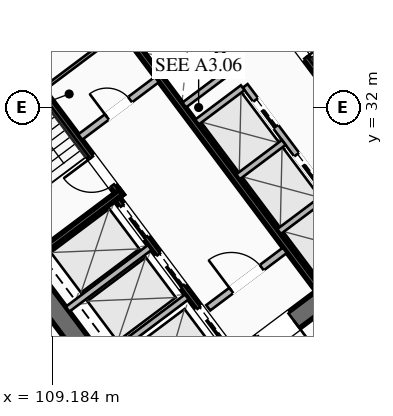
"""IFC4 building model, lengths in metres.
Left out: names, types, materials, properties, quantities, classifications, styles, units other than length and angle.
Written with IfcOpenShell. Run it as: python <this file> out.ifc"""

import sys

from ifc_helpers import new_model, si_unit, direction, frame, frame_2d, origin, place, context, subcontext, project, spatial, rectangle, extrude, element, fill, save


model = new_model("IFC4")
c1 = context("Model", 3, precision=1e-05, world=origin(), true_north=direction((0.0, 1.0)))
c2 = subcontext(c1, "Body", "Model", "MODEL_VIEW")
j1 = project(units=[si_unit("LENGTHUNIT", "METRE"), si_unit("PLANEANGLEUNIT", "RADIAN")], contexts=[c1])
p1 = place(None, origin())
s1 = spatial("IfcSite", under=j1, at=p1, CompositionType="ELEMENT")
p2 = place(p1, origin())
s2 = spatial("IfcBuilding", under=s1, at=p2, CompositionType="ELEMENT")
p3 = place(p2, frame((0.0, 0.0, 84.95)))
s3 = spatial("IfcBuildingStorey", under=s2, at=p3, CompositionType="ELEMENT", Elevation=84.95)
for number, where, z_axis, x_axis in (
    (1, (112.476, 21.107, 0.0), (0.0, 0.0, 1.0), (-0.6, 0.8, 0.0)),
    (2, (115.524, 42.893, 0.0), (0.0, 0.0, 1.0), (0.6, -0.8, 0.0)),
):
    element("IfcWall", number, at=place(p3, frame(where, z_axis=z_axis, x_axis=x_axis)), inside=s3, PredefinedType="SHEAR", context=c2, shape_type="SweptSolid", body=[
        extrude(rectangle(XDim=15.6, YDim=0.65, at=frame_2d((7.8, 0.0))), origin(), (0.0, 0.0, 1.0), 3.55),
    ])
p4 = place(p3, frame((124.429, 30.478, 0.0), z_axis=(0.0, 0.0, 1.0), x_axis=(-0.799998028465, -0.600002628705, 0.0)))
e3 = element("IfcWall", 3, at=p4, inside=s3, PredefinedType="SHEAR", context=c2, shape_type="SweptSolid", body=[
    extrude(rectangle(XDim=14.86, YDim=0.65, at=frame_2d((7.43, 0.0))), origin(), (0.0, 0.0, 1.0), 3.55),
])
p5 = place(p4, frame((9.13, 0.0, 0.0)))
e4 = element("IfcOpeningElement", 4, at=p5, cuts=e3, PredefinedType="OPENING", context=c2, shape_type="SweptSolid", body=[
    extrude(rectangle(XDim=1.25, YDim=2.25, at=frame_2d((0.625, 1.125))), frame((0.0, 0.335, 0.0), z_axis=(0.0, -1.0, 0.0), x_axis=(1.0, 0.0, 0.0)), (0.0, 0.0, 1.0), 0.67),
])
p6 = place(p4, frame((4.08, 0.0, 0.0)))
e5 = element("IfcOpeningElement", 5, at=p6, cuts=e3, PredefinedType="OPENING", context=c2, shape_type="SweptSolid", body=[
    extrude(rectangle(XDim=1.25, YDim=2.25, at=frame_2d((0.625, 1.125))), frame((0.0, 0.335, 0.0), z_axis=(0.0, -1.0, 0.0), x_axis=(1.0, 0.0, 0.0)), (0.0, 0.0, 1.0), 0.67),
])
p7 = place(p3, frame((103.571, 33.522, 0.0), z_axis=(0.0, 0.0, 1.0), x_axis=(0.799998028465, 0.600002628705, 0.0)))
e6 = element("IfcWall", 6, at=p7, inside=s3, PredefinedType="SHEAR", context=c2, shape_type="SweptSolid", body=[
    extrude(rectangle(XDim=14.86, YDim=0.65, at=frame_2d((7.43, 0.0))), origin(), (0.0, 0.0, 1.0), 3.55),
])
p8 = place(p7, frame((4.48, 0.0, 0.0)))
e7 = element("IfcOpeningElement", 7, at=p8, cuts=e6, PredefinedType="OPENING", context=c2, shape_type="SweptSolid", body=[
    extrude(rectangle(XDim=1.25, YDim=2.25, at=frame_2d((0.625, 1.125))), frame((0.0, 0.335, 0.0), z_axis=(0.0, -1.0, 0.0), x_axis=(1.0, 0.0, 0.0)), (0.0, 0.0, 1.0), 0.67),
])
p9 = place(p7, frame((9.53, 0.0, 0.0)))
e8 = element("IfcOpeningElement", 8, at=p9, cuts=e6, PredefinedType="OPENING", context=c2, shape_type="SweptSolid", body=[
    extrude(rectangle(XDim=1.25, YDim=2.25, at=frame_2d((0.625, 1.125))), frame((0.0, 0.335, 0.0), z_axis=(0.0, -1.0, 0.0), x_axis=(1.0, 0.0, 0.0)), (0.0, 0.0, 1.0), 0.67),
])
p10 = place(p3, frame((111.44, 29.08, 0.0), z_axis=(0.0, 0.0, 1.0), x_axis=(-0.600009827119, 0.799992629566, 0.0)))
e9 = element("IfcWall", 9, at=p10, inside=s3, PredefinedType="SHEAR", context=c2, shape_type="SweptSolid", body=[
    extrude(rectangle(XDim=7.95, YDim=0.2, at=frame_2d((3.975, 0.0))), origin(), (0.0, 0.0, 1.0), 3.35),
])
p11 = place(p10, frame((0.45, 0.0, 0.0)))
e10 = element("IfcOpeningElement", 10, at=p11, cuts=e9, PredefinedType="OPENING", context=c2, shape_type="SweptSolid", body=[
    extrude(rectangle(XDim=1.15, YDim=2.2, at=frame_2d((0.575, 1.1))), frame((0.0, 0.11, 0.0), z_axis=(0.0, -1.0, 0.0), x_axis=(1.0, 0.0, 0.0)), (0.0, 0.0, 1.0), 0.22),
])
p12 = place(p3, frame((108.476, 26.982, 0.0), z_axis=(0.0, 0.0, 1.0), x_axis=(0.799984290658, 0.600020945218, 0.0)))
e11 = element("IfcWall", 11, at=p12, inside=s3, PredefinedType="SHEAR", context=c2, shape_type="SweptSolid", body=[
    extrude(rectangle(XDim=3.73, YDim=0.2, at=frame_2d((1.865, 0.0))), origin(), (0.0, 0.0, 1.0), 3.35),
])
p13 = place(p3, frame((116.56, 34.92, 0.0), z_axis=(0.0, 0.0, 1.0), x_axis=(0.600009827119, -0.799992629566, 0.0)))
e12 = element("IfcWall", 12, at=p13, inside=s3, PredefinedType="SHEAR", context=c2, shape_type="SweptSolid", body=[
    extrude(rectangle(XDim=7.95, YDim=0.2, at=frame_2d((3.975, 0.0))), origin(), (0.0, 0.0, 1.0), 3.35),
])
p14 = place(p13, frame((0.45, 0.0, 0.0)))
e13 = element("IfcOpeningElement", 13, at=p14, cuts=e12, PredefinedType="OPENING", context=c2, shape_type="SweptSolid", body=[
    extrude(rectangle(XDim=1.15, YDim=2.2, at=frame_2d((0.575, 1.1))), frame((0.0, 0.11, 0.0), z_axis=(0.0, -1.0, 0.0), x_axis=(1.0, 0.0, 0.0)), (0.0, 0.0, 1.0), 0.22),
])
p15 = place(p3, frame((117.938, 26.016, 0.0), z_axis=(0.0, 0.0, 1.0), x_axis=(-0.600005463273, 0.799995902516, 0.0)))
e14 = element("IfcWall", 14, at=p15, inside=s3, PredefinedType="SHEAR", context=c2, shape_type="SweptSolid", body=[
    extrude(rectangle(XDim=14.3, YDim=0.2, at=frame_2d((7.15, 0.0))), origin(), (0.0, 0.0, 1.0), 3.35),
])
p16 = place(p3, frame((110.104, 31.028, 0.0), z_axis=(0.0, 0.0, 1.0), x_axis=(0.800018601094, 0.59997519774, 0.0)))
e15 = element("IfcWall", 15, at=p16, inside=s3, PredefinedType="SOLIDWALL", context=c2, shape_type="SweptSolid", body=[
    extrude(rectangle(XDim=3.15, YDim=0.22, at=frame_2d((1.575, 0.0))), origin(), (0.0, 0.0, 1.0), 2.703),
])
p17 = place(p16, frame((1.1, 0.0, 0.0)))
e16 = element("IfcOpeningElement", 16, at=p17, cuts=e15, PredefinedType="OPENING", context=c2, shape_type="SweptSolid", body=[
    extrude(rectangle(XDim=0.95, YDim=2.05, at=frame_2d((0.475, 1.025))), frame((0.0, 0.12, 0.0), z_axis=(0.0, -1.0, 0.0), x_axis=(1.0, 0.0, 0.0)), (0.0, 0.0, 1.0), 0.24),
])
p18 = place(p3, frame((114.316, 25.412, 0.0), z_axis=(0.0, 0.0, 1.0), x_axis=(0.800018601094, 0.59997519774, 0.0)))
e17 = element("IfcWall", 17, at=p18, inside=s3, PredefinedType="SOLIDWALL", context=c2, shape_type="SweptSolid", body=[
    extrude(rectangle(XDim=3.15, YDim=0.22, at=frame_2d((1.575, 0.0))), origin(), (0.0, 0.0, 1.0), 2.703),
])
p19 = place(p18, frame((0.95, 0.0, 0.0)))
e18 = element("IfcOpeningElement", 18, at=p19, cuts=e17, PredefinedType="OPENING", context=c2, shape_type="SweptSolid", body=[
    extrude(rectangle(XDim=1.25, YDim=2.25, at=frame_2d((0.625, 1.125))), frame((0.0, 0.12, 0.0), z_axis=(0.0, -1.0, 0.0), x_axis=(1.0, 0.0, 0.0)), (0.0, 0.0, 1.0), 0.24),
])
p20 = place(p3, frame((115.13, 23.91, 0.0), z_axis=(0.0, 0.0, 1.0), x_axis=(-0.599975393228, 0.800018454488, 0.0)))
e19 = element("IfcWall", 19, at=p20, inside=s3, PredefinedType="SHEAR", context=c2, shape_type="SweptSolid", body=[
    extrude(rectangle(XDim=6.35, YDim=0.2, at=frame_2d((3.175, 0.0))), origin(), (0.0, 0.0, 1.0), 3.35),
])
p21 = place(p20, frame((4.775, 0.0, 0.0)))
e20 = element("IfcOpeningElement", 20, at=p21, cuts=e19, PredefinedType="OPENING", context=c2, shape_type="SweptSolid", body=[
    extrude(rectangle(XDim=1.3, YDim=2.25, at=frame_2d((0.65, 1.125))), frame((0.0, 0.11, 0.0), z_axis=(0.0, -1.0, 0.0), x_axis=(1.0, 0.0, 0.0)), (0.0, 0.0, 1.0), 0.22),
])
p22 = place(p20, frame((2.775, 0.0, 0.0)))
e21 = element("IfcOpeningElement", 21, at=p22, cuts=e19, PredefinedType="OPENING", context=c2, shape_type="SweptSolid", body=[
    extrude(rectangle(XDim=1.3, YDim=2.25, at=frame_2d((0.65, 1.125))), frame((0.0, 0.11, 0.0), z_axis=(0.0, -1.0, 0.0), x_axis=(1.0, 0.0, 0.0)), (0.0, 0.0, 1.0), 0.22),
])
p23 = place(p20, frame((0.575, 0.0, 0.0)))
e22 = element("IfcOpeningElement", 22, at=p23, cuts=e19, PredefinedType="OPENING", context=c2, shape_type="SweptSolid", body=[
    extrude(rectangle(XDim=1.3, YDim=2.25, at=frame_2d((0.65, 1.125))), frame((0.0, 0.11, 0.0), z_axis=(0.0, -1.0, 0.0), x_axis=(1.0, 0.0, 0.0)), (0.0, 0.0, 1.0), 0.22),
])
for number, where, z_axis, x_axis in (
    (23, (110.906, 23.742, 0.0), (0.0, 0.0, 1.0), (0.8, 0.6, 0.0)),
    (24, (109.688, 25.366, 0.0), (0.0, 0.0, 1.0), (0.8, 0.6, 0.0)),
):
    element("IfcWall", number, at=place(p3, frame(where, z_axis=z_axis, x_axis=x_axis)), inside=s3, PredefinedType="SOLIDWALL", context=c2, shape_type="SweptSolid", body=[
        extrude(rectangle(XDim=3.38, YDim=0.2, at=frame_2d((1.69, 0.0))), origin(), (0.0, 0.0, 1.0), 3.35),
    ])
p24 = place(p3, frame((108.91, 32.62, 0.0), z_axis=(0.0, 0.0, 1.0), x_axis=(0.800018601094, 0.59997519774, 0.0)))
e25 = element("IfcWall", 25, at=p24, inside=s3, PredefinedType="PARTITIONING", context=c2, shape_type="SweptSolid", body=[
    extrude(rectangle(XDim=3.15, YDim=0.11, at=frame_2d((1.575, 0.0))), origin(), (0.0, 0.0, 1.0), 2.703),
])
p25 = place(p3, frame((119.61, 27.27, 0.0), z_axis=(0.0, 0.0, 1.0), x_axis=(-0.600011488909, 0.79999138319, 0.0)))
e26 = element("IfcWall", 26, at=p25, inside=s3, PredefinedType="SOLIDWALL", context=c2, shape_type="SweptSolid", body=[
    extrude(rectangle(XDim=6.8, YDim=0.2, at=frame_2d((3.4, 0.0))), origin(), (0.0, 0.0, 1.0), 3.35),
])
p26 = place(p25, frame((0.625, 0.0, 0.0)))
e27 = element("IfcOpeningElement", 27, at=p26, cuts=e26, PredefinedType="OPENING", context=c2, shape_type="SweptSolid", body=[
    extrude(rectangle(XDim=1.1, YDim=2.2, at=frame_2d((0.55, 1.1))), frame((0.0, 0.11, 0.0), z_axis=(0.0, -1.0, 0.0), x_axis=(1.0, 0.0, 0.0)), (0.0, 0.0, 1.0), 0.22),
])
p27 = place(p25, frame((2.875, 0.0, 0.0)))
e28 = element("IfcOpeningElement", 28, at=p27, cuts=e26, PredefinedType="OPENING", context=c2, shape_type="SweptSolid", body=[
    extrude(rectangle(XDim=1.1, YDim=2.2, at=frame_2d((0.55, 1.1))), frame((0.0, 0.11, 0.0), z_axis=(0.0, -1.0, 0.0), x_axis=(1.0, 0.0, 0.0)), (0.0, 0.0, 1.0), 0.22),
])
p28 = place(p25, frame((5.125, 0.0, 0.0)))
e29 = element("IfcOpeningElement", 29, at=p28, cuts=e26, PredefinedType="OPENING", context=c2, shape_type="SweptSolid", body=[
    extrude(rectangle(XDim=1.1, YDim=2.2, at=frame_2d((0.55, 1.1))), frame((0.0, 0.11, 0.0), z_axis=(0.0, -1.0, 0.0), x_axis=(1.0, 0.0, 0.0)), (0.0, 0.0, 1.0), 0.22),
])
p29 = place(p3, frame((116.646, 27.922, 0.0), z_axis=(0.0, 0.0, 1.0), x_axis=(0.8, 0.6, 0.0)))
e30 = element("IfcWall", 30, at=p29, inside=s3, PredefinedType="SOLIDWALL", context=c2, shape_type="SweptSolid", body=[
    extrude(rectangle(XDim=1.88, YDim=0.2, at=frame_2d((0.94, 0.0))), origin(), (0.0, 0.0, 1.0), 3.35),
])
p30 = place(p3, frame((115.296, 29.722, 0.0), z_axis=(0.0, 0.0, 1.0), x_axis=(0.799984418148, 0.600020775241, 0.0)))
e31 = element("IfcWall", 31, at=p30, inside=s3, PredefinedType="SOLIDWALL", context=c2, shape_type="SweptSolid", body=[
    extrude(rectangle(XDim=1.88, YDim=0.2, at=frame_2d((0.94, 0.0))), origin(), (0.0, 0.0, 1.0), 3.35),
])
p31 = place(p3, frame((113.946, 31.522, 0.0), z_axis=(0.0, 0.0, 1.0), x_axis=(0.8, 0.6, 0.0)))
e32 = element("IfcWall", 32, at=p31, inside=s3, PredefinedType="SOLIDWALL", context=c2, shape_type="SweptSolid", body=[
    extrude(rectangle(XDim=1.88, YDim=0.2, at=frame_2d((0.94, 0.0))), origin(), (0.0, 0.0, 1.0), 3.35),
])
p32 = place(p3, frame((115.11, 33.27, 0.0), z_axis=(0.0, 0.0, 1.0), x_axis=(-0.600011488909, 0.79999138319, 0.0)))
e33 = element("IfcWall", 33, at=p32, inside=s3, PredefinedType="SOLIDWALL", context=c2, shape_type="SweptSolid", body=[
    extrude(rectangle(XDim=6.8, YDim=0.2, at=frame_2d((3.4, 0.0))), origin(), (0.0, 0.0, 1.0), 3.35),
])
p33 = place(p3, frame((113.526, 32.082, 0.0), z_axis=(0.0, 0.0, 1.0), x_axis=(0.800046745961, 0.599937666993, 0.0)))
e34 = element("IfcWall", 34, at=p33, inside=s3, PredefinedType="SOLIDWALL", context=c2, shape_type="SweptSolid", body=[
    extrude(rectangle(XDim=1.88, YDim=0.2, at=frame_2d((0.94, 0.0))), origin(), (0.0, 0.0, 1.0), 3.35),
])
p34 = place(p3, frame((112.176, 33.882, 0.0), z_axis=(0.0, 0.0, 1.0), x_axis=(0.8, 0.6, 0.0)))
e35 = element("IfcWall", 35, at=p34, inside=s3, PredefinedType="SOLIDWALL", context=c2, shape_type="SweptSolid", body=[
    extrude(rectangle(XDim=1.88, YDim=0.2, at=frame_2d((0.94, 0.0))), origin(), (0.0, 0.0, 1.0), 3.35),
])
p35 = place(p3, frame((134.18, 33.51, 0.0), z_axis=(0.0, 0.0, 1.0), x_axis=(-0.8, -0.6, 0.0)))
e36 = element("IfcWall", 36, at=p35, inside=s3, PredefinedType="PARTITIONING", context=c2, shape_type="SweptSolid", body=[
    extrude(rectangle(XDim=28.23, YDim=0.135, at=frame_2d((14.115, 0.0))), origin(), (0.0, 0.0, 1.0), 2.703),
])
p36 = place(p35, frame((26.9, 0.0, 0.0)))
e37 = element("IfcOpeningElement", 37, at=p36, cuts=e36, PredefinedType="OPENING", context=c2, shape_type="SweptSolid", body=[
    extrude(rectangle(XDim=0.95, YDim=2.05, at=frame_2d((0.475, 1.025))), frame((0.0, 0.077, 0.0), z_axis=(0.0, -1.0, 0.0), x_axis=(1.0, 0.0, 0.0)), (0.0, 0.0, 1.0), 0.155),
])
p37 = place(p35, frame((16.368, 0.0, 0.0)))
e38 = element("IfcOpeningElement", 38, at=p37, cuts=e36, PredefinedType="OPENING", context=c2, shape_type="SweptSolid", body=[
    extrude(rectangle(XDim=0.95, YDim=2.05, at=frame_2d((0.475, 1.025))), frame((0.0, 0.077, 0.0), z_axis=(0.0, -1.0, 0.0), x_axis=(1.0, 0.0, 0.0)), (0.0, 0.0, 1.0), 0.155),
])
p38 = place(p35, frame((0.38, 0.0, 0.0)))
e39 = element("IfcOpeningElement", 39, at=p38, cuts=e36, PredefinedType="OPENING", context=c2, shape_type="SweptSolid", body=[
    extrude(rectangle(XDim=0.95, YDim=2.05, at=frame_2d((0.475, 1.025))), frame((0.0, 0.077, 0.0), z_axis=(0.0, -1.0, 0.0), x_axis=(1.0, 0.0, 0.0)), (0.0, 0.0, 1.0), 0.155),
])
p39 = place(p3, frame((111.548, 16.636, 0.0), z_axis=(0.0, 0.0, 1.0), x_axis=(-0.600001780419, 0.799998664682, 0.0)))
e40 = element("IfcWall", 40, at=p39, inside=s3, PredefinedType="PARTITIONING", context=c2, shape_type="SweptSolid", body=[
    extrude(rectangle(XDim=21.94, YDim=0.135, at=frame_2d((10.97, 0.0))), origin(), (0.0, 0.0, 1.0), 2.703),
])
p40 = place(p39, frame((20.69, 0.0, 0.0)))
e41 = element("IfcOpeningElement", 41, at=p40, cuts=e40, PredefinedType="OPENING", context=c2, shape_type="SweptSolid", body=[
    extrude(rectangle(XDim=0.95, YDim=2.05, at=frame_2d((0.475, 1.025))), frame((0.0, 0.077, 0.0), z_axis=(0.0, -1.0, 0.0), x_axis=(1.0, 0.0, 0.0)), (0.0, 0.0, 1.0), 0.155),
])
p41 = place(p5, origin())
e42 = element("IfcDoor", 42, at=p41, inside=s3, OperationType="SINGLE_SWING_LEFT", PredefinedType="DOOR", context=c2, shape_type="SweptSolid", body=[
    extrude(rectangle(XDim=1.25, YDim=2.25, at=frame_2d((0.625, 1.125))), frame((0.0, 0.025, 0.0), z_axis=(0.0, -1.0, 0.0), x_axis=(1.0, 0.0, 0.0)), (0.0, 0.0, 1.0), 0.05),
])
fill(e4, e42)
p42 = place(p11, origin())
e43 = element("IfcDoor", 43, at=p42, inside=s3, OperationType="SINGLE_SWING_RIGHT", PredefinedType="DOOR", context=c2, shape_type="SweptSolid", body=[
    extrude(rectangle(XDim=1.15, YDim=2.2, at=frame_2d((0.575, 1.1))), frame((0.0, 0.025, 0.0), z_axis=(0.0, -1.0, 0.0), x_axis=(1.0, 0.0, 0.0)), (0.0, 0.0, 1.0), 0.05),
])
fill(e10, e43)
p43 = place(p14, origin())
e44 = element("IfcDoor", 44, at=p43, inside=s3, OperationType="SINGLE_SWING_RIGHT", PredefinedType="DOOR", context=c2, shape_type="SweptSolid", body=[
    extrude(rectangle(XDim=1.15, YDim=2.2, at=frame_2d((0.575, 1.1))), frame((0.0, 0.025, 0.0), z_axis=(0.0, -1.0, 0.0), x_axis=(1.0, 0.0, 0.0)), (0.0, 0.0, 1.0), 0.05),
])
fill(e13, e44)
p44 = place(p19, origin())
e45 = element("IfcDoor", 45, at=p44, inside=s3, OperationType="SINGLE_SWING_LEFT", PredefinedType="DOOR", context=c2, shape_type="SweptSolid", body=[
    extrude(rectangle(XDim=1.25, YDim=2.25, at=frame_2d((0.625, 1.125))), frame((0.0, 0.025, 0.0), z_axis=(0.0, -1.0, 0.0), x_axis=(1.0, 0.0, 0.0)), (0.0, 0.0, 1.0), 0.05),
])
fill(e18, e45)
p45 = place(p17, origin())
e46 = element("IfcDoor", 46, at=p45, inside=s3, OperationType="SINGLE_SWING_LEFT", PredefinedType="DOOR", context=c2, shape_type="SweptSolid", body=[
    extrude(rectangle(XDim=0.95, YDim=2.05, at=frame_2d((0.475, 1.025))), frame((0.0, 0.025, 0.0), z_axis=(0.0, -1.0, 0.0), x_axis=(1.0, 0.0, 0.0)), (0.0, 0.0, 1.0), 0.05),
])
fill(e16, e46)
p46 = place(p21, origin())
e47 = element("IfcDoor", 47, at=p46, inside=s3, OperationType="SLIDING_TO_LEFT", PredefinedType="DOOR", context=c2, shape_type="SweptSolid", body=[
    extrude(rectangle(XDim=1.3, YDim=2.25, at=frame_2d((0.65, 1.125))), frame((0.0, 0.025, 0.0), z_axis=(0.0, -1.0, 0.0), x_axis=(1.0, 0.0, 0.0)), (0.0, 0.0, 1.0), 0.05),
])
fill(e20, e47)
p47 = place(p22, origin())
e48 = element("IfcDoor", 48, at=p47, inside=s3, OperationType="SLIDING_TO_LEFT", PredefinedType="DOOR", context=c2, shape_type="SweptSolid", body=[
    extrude(rectangle(XDim=1.3, YDim=2.25, at=frame_2d((0.65, 1.125))), frame((0.0, 0.025, 0.0), z_axis=(0.0, -1.0, 0.0), x_axis=(1.0, 0.0, 0.0)), (0.0, 0.0, 1.0), 0.05),
])
fill(e21, e48)
p48 = place(p23, origin())
e49 = element("IfcDoor", 49, at=p48, inside=s3, OperationType="SLIDING_TO_LEFT", PredefinedType="DOOR", context=c2, shape_type="SweptSolid", body=[
    extrude(rectangle(XDim=1.3, YDim=2.25, at=frame_2d((0.65, 1.125))), frame((0.0, 0.025, 0.0), z_axis=(0.0, -1.0, 0.0), x_axis=(1.0, 0.0, 0.0)), (0.0, 0.0, 1.0), 0.05),
])
fill(e22, e49)
p49 = place(p27, origin())
e50 = element("IfcDoor", 50, at=p49, inside=s3, OperationType="SLIDING_TO_LEFT", PredefinedType="DOOR", context=c2, shape_type="SweptSolid", body=[
    extrude(rectangle(XDim=1.1, YDim=2.2, at=frame_2d((0.55, 1.1))), frame((0.0, 0.025, 0.0), z_axis=(0.0, -1.0, 0.0), x_axis=(1.0, 0.0, 0.0)), (0.0, 0.0, 1.0), 0.05),
])
fill(e28, e50)
p50 = place(p28, origin())
e51 = element("IfcDoor", 51, at=p50, inside=s3, OperationType="SLIDING_TO_LEFT", PredefinedType="DOOR", context=c2, shape_type="SweptSolid", body=[
    extrude(rectangle(XDim=1.1, YDim=2.2, at=frame_2d((0.55, 1.1))), frame((0.0, 0.025, 0.0), z_axis=(0.0, -1.0, 0.0), x_axis=(1.0, 0.0, 0.0)), (0.0, 0.0, 1.0), 0.05),
])
fill(e29, e51)
save(model, sys.argv[1])
